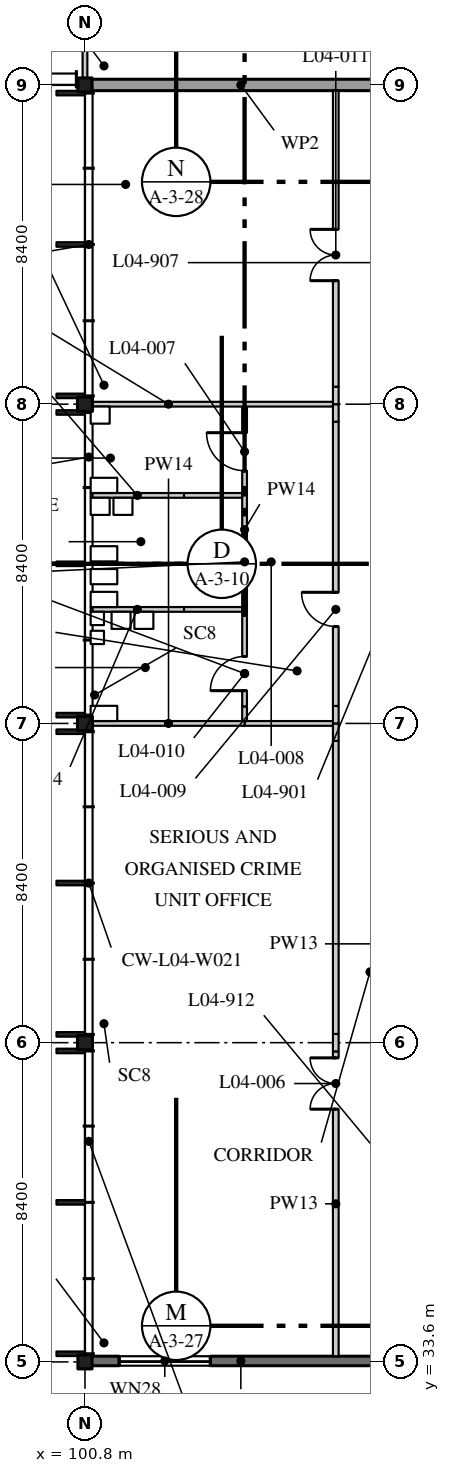
"""IFC4 building model, lengths in metres.
Left out: names, types, materials, properties, quantities, classifications, styles, units other than length and angle.
Written with IfcOpenShell. Run it as: python <this file> out.ifc"""

import sys

from ifc_helpers import new_model, si_unit, direction, frame, frame_2d, origin, origin_2d, place, context, subcontext, project, spatial, rectangle, i_section, extrude, element, fill, save


model = new_model("IFC4")
c1 = context("Model", 3, precision=1e-05, world=origin(), true_north=direction((0.0, 1.0)))
c2 = subcontext(c1, "Body", "Model", "MODEL_VIEW")
j1 = project(units=[si_unit("LENGTHUNIT", "METRE"), si_unit("PLANEANGLEUNIT", "RADIAN")], contexts=[c1])
p1 = place(None, origin())
s1 = spatial("IfcSite", under=j1, at=p1, CompositionType="ELEMENT")
p2 = place(p1, origin())
s2 = spatial("IfcBuilding", under=s1, at=p2, CompositionType="ELEMENT")
p3 = place(p2, frame((0.0, 0.0, 18.9)))
s3 = spatial("IfcBuildingStorey", under=s2, at=p3, CompositionType="ELEMENT", Elevation=18.9)
p4 = place(p3, frame((100.8, 33.6, 0.0), z_axis=(0.0, 0.0, 1.0), x_axis=(1.0, 0.0, 0.0)))
e1 = element("IfcColumn", 1, at=p4, inside=s3, PredefinedType="COLUMN", context=c2, shape_type="SweptSolid", body=[
    extrude(i_section(OverallWidth=0.373, OverallDepth=0.368, WebThickness=0.015, FlangeThickness=0.024, FilletRadius=0.015, at=origin_2d()), origin(), (0.0, 0.0, 1.0), 4.37),
])
for number, where, z_axis, x_axis in (
    (2, (100.8, 42.0, 0.0), (0.0, 0.0, 1.0), (1.0, 0.0, 0.0)),
    (3, (100.8, 50.4, 0.0), (0.0, 0.0, 1.0), (1.0, 0.0, 0.0)),
    (4, (100.8, 58.8, 0.0), (0.0, 0.0, 1.0), (1.0, 0.0, 0.0)),
):
    element("IfcColumn", number, at=place(p3, frame(where, z_axis=z_axis, x_axis=x_axis)), inside=s3, PredefinedType="COLUMN", context=c2, shape_type="SweptSolid", body=[
        extrude(i_section(OverallWidth=0.394, OverallDepth=0.376, WebThickness=0.017, FlangeThickness=0.028, FilletRadius=0.015, at=origin_2d()), origin(), (0.0, 0.0, 1.0), 4.37),
    ])
p5 = place(p3, frame((100.8, 67.2, 0.0), z_axis=(0.0, 0.0, 1.0), x_axis=(1.0, 0.0, 0.0)))
e5 = element("IfcColumn", 5, at=p5, inside=s3, PredefinedType="COLUMN", context=c2, shape_type="SweptSolid", body=[
    extrude(i_section(OverallWidth=0.373, OverallDepth=0.368, WebThickness=0.015, FlangeThickness=0.024, FilletRadius=0.015, at=origin_2d()), origin(), (0.0, 0.0, 1.0), 4.37),
])
p6 = place(p3, frame((107.4, 33.75, 0.0), z_axis=(0.0, 0.0, 1.0), x_axis=(0.0, 1.0, 0.0)))
e6 = element("IfcWall", 6, at=p6, inside=s3, PredefinedType="PARTITIONING", context=c2, shape_type="SweptSolid", body=[
    extrude(rectangle(XDim=8.02, YDim=0.15, at=frame_2d((4.01, 0.0))), origin(), (0.0, 0.0, 1.0), 4.37),
])
p7 = place(p6, frame((6.5, 0.0, 0.0)))
e7 = element("IfcOpeningElement", 7, at=p7, cuts=e6, PredefinedType="OPENING", context=c2, shape_type="SweptSolid", body=[
    extrude(rectangle(XDim=1.35, YDim=2.1, at=frame_2d((0.675, 1.05))), frame((0.0, 0.085, 0.0), z_axis=(0.0, -1.0, 0.0), x_axis=(1.0, 0.0, 0.0)), (0.0, 0.0, 1.0), 0.17),
])
p8 = place(p3, frame((107.4, 41.77, 0.0), z_axis=(0.0, 0.0, 1.0), x_axis=(0.0, 1.0, 0.0)))
e8 = element("IfcWall", 8, at=p8, inside=s3, PredefinedType="PARTITIONING", context=c2, shape_type="SweptSolid", body=[
    extrude(rectangle(XDim=0.46, YDim=0.15, at=frame_2d((0.23, 0.0))), origin(), (0.0, 0.0, 1.0), 3.746),
])
p9 = place(p3, frame((107.4, 42.23, 0.0), z_axis=(0.0, 0.0, 1.0), x_axis=(0.0, 1.0, 0.0)))
e9 = element("IfcWall", 9, at=p9, inside=s3, PredefinedType="PARTITIONING", context=c2, shape_type="SweptSolid", body=[
    extrude(rectangle(XDim=7.71, YDim=0.15, at=frame_2d((3.855, 0.0))), origin(), (0.0, 0.0, 1.0), 4.37),
])
p10 = place(p3, frame((107.4, 49.94, 0.0), z_axis=(0.0, 0.0, 1.0), x_axis=(0.0, 1.0, 0.0)))
e10 = element("IfcWall", 10, at=p10, inside=s3, PredefinedType="PARTITIONING", context=c2, shape_type="SweptSolid", body=[
    extrude(rectangle(XDim=0.46, YDim=0.15, at=frame_2d((0.23, 0.0))), origin(), (0.0, 0.0, 1.0), 3.746),
])
p11 = place(p3, frame((107.4, 50.4, 0.0), z_axis=(0.0, 0.0, 1.0), x_axis=(0.0, 1.0, 0.0)))
e11 = element("IfcWall", 11, at=p11, inside=s3, PredefinedType="PARTITIONING", context=c2, shape_type="SweptSolid", body=[
    extrude(rectangle(XDim=0.46, YDim=0.15, at=frame_2d((0.23, 0.0))), origin(), (0.0, 0.0, 1.0), 3.746),
])
p12 = place(p3, frame((107.4, 50.86, 0.0), z_axis=(0.0, 0.0, 1.0), x_axis=(0.0, 1.0, 0.0)))
e12 = element("IfcWall", 12, at=p12, inside=s3, PredefinedType="PARTITIONING", context=c2, shape_type="SweptSolid", body=[
    extrude(rectangle(XDim=7.48, YDim=0.15, at=frame_2d((3.74, 0.0))), origin(), (0.0, 0.0, 1.0), 4.37),
])
p13 = place(p12, frame((2.09, 0.0, 0.0)))
e13 = element("IfcOpeningElement", 13, at=p13, cuts=e12, PredefinedType="OPENING", context=c2, shape_type="SweptSolid", body=[
    extrude(rectangle(XDim=0.9, YDim=2.1, at=frame_2d((0.45, 1.05))), frame((0.0, 0.085, 0.0), z_axis=(0.0, -1.0, 0.0), x_axis=(1.0, 0.0, 0.0)), (0.0, 0.0, 1.0), 0.17),
])
for number, where, z_axis, x_axis in (
    (14, (107.4, 58.34, 0.0), (0.0, 0.0, 1.0), (0.0, 1.0, 0.0)),
    (15, (107.4, 58.8, 0.0), (0.0, 0.0, 1.0), (0.0, 1.0, 0.0)),
):
    element("IfcWall", number, at=place(p3, frame(where, z_axis=z_axis, x_axis=x_axis)), inside=s3, PredefinedType="PARTITIONING", context=c2, shape_type="SweptSolid", body=[
        extrude(rectangle(XDim=0.46, YDim=0.15, at=frame_2d((0.23, 0.0))), origin(), (0.0, 0.0, 1.0), 3.746),
    ])
p14 = place(p3, frame((107.4, 59.26, 0.0), z_axis=(0.0, 0.0, 1.0), x_axis=(0.0, 1.0, 0.0)))
e16 = element("IfcWall", 16, at=p14, inside=s3, PredefinedType="PARTITIONING", context=c2, shape_type="SweptSolid", body=[
    extrude(rectangle(XDim=7.79, YDim=0.15, at=frame_2d((3.895, 0.0))), origin(), (0.0, 0.0, 1.0), 4.37),
])
p15 = place(p14, frame((2.79, 0.0, 0.0)))
e17 = element("IfcOpeningElement", 17, at=p15, cuts=e16, PredefinedType="OPENING", context=c2, shape_type="SweptSolid", body=[
    extrude(rectangle(XDim=1.35, YDim=2.1, at=frame_2d((0.675, 1.05))), frame((0.0, 0.085, 0.0), z_axis=(0.0, -1.0, 0.0), x_axis=(1.0, 0.0, 0.0)), (0.0, 0.0, 1.0), 0.17),
])
p16 = place(p3, frame((105.0, 50.4, 0.0), z_axis=(0.0, 0.0, 1.0), x_axis=(1.0, 0.0, 0.0)))
e18 = element("IfcWall", 18, at=p16, inside=s3, PredefinedType="PARTITIONING", context=c2, shape_type="SweptSolid", body=[
    extrude(rectangle(XDim=2.325, YDim=0.125, at=frame_2d((1.163, 0.0))), origin(), (0.0, 0.0, 1.0), 3.746),
])
p17 = place(p3, frame((100.997, 50.4, 0.0), z_axis=(0.0, 0.0, 1.0), x_axis=(1.0, 0.0, 0.0)))
e19 = element("IfcWall", 19, at=p17, inside=s3, PredefinedType="PARTITIONING", context=c2, shape_type="SweptSolid", body=[
    extrude(rectangle(XDim=4.003, YDim=0.125, at=frame_2d((2.001, 0.0))), origin(), (0.0, 0.0, 1.0), 3.746),
])
p18 = place(p3, frame((100.95, 56.4, 0.0), z_axis=(0.0, 0.0, 1.0), x_axis=(1.0, 0.0, 0.0)))
e20 = element("IfcWall", 20, at=p18, inside=s3, PredefinedType="PARTITIONING", context=c2, shape_type="SweptSolid", body=[
    extrude(rectangle(XDim=2.457, YDim=0.125, at=frame_2d((1.229, 0.0))), origin(), (0.0, 0.0, 1.0), 4.37),
])
p19 = place(p3, frame((103.407, 56.4, 0.0), z_axis=(0.0, 0.0, 1.0), x_axis=(1.0, 0.0, 0.0)))
e21 = element("IfcWall", 21, at=p19, inside=s3, PredefinedType="PARTITIONING", context=c2, shape_type="SweptSolid", body=[
    extrude(rectangle(XDim=1.531, YDim=0.125, at=frame_2d((0.766, 0.0))), origin(), (0.0, 0.0, 1.0), 3.895),
])
p20 = place(p3, frame((105.0, 56.4, 0.0), z_axis=(0.0, 0.0, 1.0), x_axis=(0.0, 1.0, 0.0)))
e22 = element("IfcWall", 22, at=p20, inside=s3, PredefinedType="PARTITIONING", context=c2, shape_type="SweptSolid", body=[
    extrude(rectangle(XDim=1.952, YDim=0.125, at=frame_2d((0.976, 0.0))), origin(), (0.0, 0.0, 1.0), 4.37),
])
p21 = place(p20, frame((0.65, 0.0, 0.0)))
e23 = element("IfcOpeningElement", 23, at=p21, cuts=e22, PredefinedType="OPENING", context=c2, shape_type="SweptSolid", body=[
    extrude(rectangle(XDim=1.0, YDim=2.1, at=frame_2d((0.5, 1.05))), frame((0.0, 0.073, 0.0), z_axis=(0.0, -1.0, 0.0), x_axis=(1.0, 0.0, 0.0)), (0.0, 0.0, 1.0), 0.145),
])
p22 = place(p3, frame((105.0, 58.352, 0.0), z_axis=(0.0, 0.0, 1.0), x_axis=(0.0, 1.0, 0.0)))
e24 = element("IfcWall", 24, at=p22, inside=s3, PredefinedType="PARTITIONING", context=c2, shape_type="SweptSolid", body=[
    extrude(rectangle(XDim=0.385, YDim=0.125, at=frame_2d((0.192, 0.0))), origin(), (0.0, 0.0, 1.0), 3.746),
])
p23 = place(p3, frame((100.997, 58.8, 0.0), z_axis=(0.0, 0.0, 1.0), x_axis=(1.0, 0.0, 0.0)))
e25 = element("IfcWall", 25, at=p23, inside=s3, PredefinedType="PARTITIONING", context=c2, shape_type="SweptSolid", body=[
    extrude(rectangle(XDim=4.003, YDim=0.125, at=frame_2d((2.001, 0.0))), origin(), (0.0, 0.0, 1.0), 3.746),
])
p24 = place(p3, frame((105.0, 53.4, 0.0), z_axis=(0.0, 0.0, 1.0), x_axis=(0.0, 1.0, 0.0)))
e26 = element("IfcWall", 26, at=p24, inside=s3, PredefinedType="PARTITIONING", context=c2, shape_type="SweptSolid", body=[
    extrude(rectangle(XDim=3.0, YDim=0.125, at=frame_2d((1.5, 0.0))), origin(), (0.0, 0.0, 1.0), 4.37),
])
p25 = place(p24, frame((0.8, 0.0, 0.0)))
e27 = element("IfcOpeningElement", 27, at=p25, cuts=e26, PredefinedType="OPENING", context=c2, shape_type="SweptSolid", body=[
    extrude(rectangle(XDim=0.9, YDim=2.1, at=frame_2d((0.45, 1.05))), frame((0.0, 0.073, 0.0), z_axis=(0.0, -1.0, 0.0), x_axis=(1.0, 0.0, 0.0)), (0.0, 0.0, 1.0), 0.145),
])
p26 = place(p3, frame((100.95, 53.4, 0.0), z_axis=(0.0, 0.0, 1.0), x_axis=(1.0, 0.0, 0.0)))
e28 = element("IfcWall", 28, at=p26, inside=s3, PredefinedType="PARTITIONING", context=c2, shape_type="SweptSolid", body=[
    extrude(rectangle(XDim=2.457, YDim=0.125, at=frame_2d((1.229, 0.0))), origin(), (0.0, 0.0, 1.0), 4.37),
])
p27 = place(p3, frame((103.407, 53.4, 0.0), z_axis=(0.0, 0.0, 1.0), x_axis=(1.0, 0.0, 0.0)))
e29 = element("IfcWall", 29, at=p27, inside=s3, PredefinedType="PARTITIONING", context=c2, shape_type="SweptSolid", body=[
    extrude(rectangle(XDim=1.531, YDim=0.125, at=frame_2d((0.766, 0.0))), origin(), (0.0, 0.0, 1.0), 3.895),
])
p28 = place(p3, frame((105.0, 50.462, 0.0), z_axis=(0.0, 0.0, 1.0), x_axis=(0.0, 1.0, 0.0)))
e30 = element("IfcWall", 30, at=p28, inside=s3, PredefinedType="PARTITIONING", context=c2, shape_type="SweptSolid", body=[
    extrude(rectangle(XDim=0.385, YDim=0.125, at=frame_2d((0.192, 0.0))), origin(), (0.0, 0.0, 1.0), 3.746),
])
p29 = place(p3, frame((105.0, 50.847, 0.0), z_axis=(0.0, 0.0, 1.0), x_axis=(0.0, 1.0, 0.0)))
e31 = element("IfcWall", 31, at=p29, inside=s3, PredefinedType="PARTITIONING", context=c2, shape_type="SweptSolid", body=[
    extrude(rectangle(XDim=2.553, YDim=0.125, at=frame_2d((1.276, 0.0))), origin(), (0.0, 0.0, 1.0), 4.37),
])
p30 = place(p29, frame((0.415, 0.0, 0.0)))
e32 = element("IfcOpeningElement", 32, at=p30, cuts=e31, PredefinedType="OPENING", context=c2, shape_type="SweptSolid", body=[
    extrude(rectangle(XDim=0.9, YDim=2.1, at=frame_2d((0.45, 1.05))), frame((0.0, 0.073, 0.0), z_axis=(0.0, -1.0, 0.0), x_axis=(1.0, 0.0, 0.0)), (0.0, 0.0, 1.0), 0.145),
])
p31 = place(p3, frame((105.0, 58.8, 0.0), z_axis=(0.0, 0.0, 1.0), x_axis=(1.0, 0.0, 0.0)))
e33 = element("IfcWall", 33, at=p31, inside=s3, PredefinedType="PARTITIONING", context=c2, shape_type="SweptSolid", body=[
    extrude(rectangle(XDim=2.325, YDim=0.125, at=frame_2d((1.163, 0.0))), origin(), (0.0, 0.0, 1.0), 3.746),
])
p32 = place(p3, frame((100.8, 67.384, 0.0), z_axis=(0.0, 0.0, 1.0), x_axis=(0.0, 1.0, 0.0)))
e34 = element("IfcWall", 34, at=p32, inside=s3, PredefinedType="PARTITIONING", context=c2, shape_type="SweptSolid", body=[
    extrude(rectangle(XDim=6.641, YDim=0.125, at=frame_2d((3.32, 0.0))), origin(), (0.0, 0.0, 1.0), 3.819),
])
p33 = place(p3, frame((100.803, 33.625, 0.0), z_axis=(0.0, 0.0, 1.0), x_axis=(1.0, 0.0, 0.0)))
e35 = element("IfcWall", 35, at=p33, inside=s3, PredefinedType="SOLIDWALL", context=c2, shape_type="SweptSolid", body=[
    extrude(rectangle(XDim=8.197, YDim=0.25, at=frame_2d((4.099, 0.0))), origin(), (0.0, 0.0, 1.0), 3.746),
])
p34 = place(p33, frame((0.897, 0.0, 0.9)))
e36 = element("IfcOpeningElement", 36, at=p34, cuts=e35, PredefinedType="OPENING", context=c2, shape_type="SweptSolid", body=[
    extrude(rectangle(XDim=2.4, YDim=2.1, at=frame_2d((1.2, 1.05))), frame((0.0, 0.135, 0.0), z_axis=(0.0, -1.0, 0.0), x_axis=(1.0, 0.0, 0.0)), (0.0, 0.0, 1.0), 0.27),
])
p35 = place(p3, frame((109.0, 67.2, 0.0), z_axis=(0.0, 0.0, 1.0), x_axis=(-1.0, 0.0, 0.0)))
e37 = element("IfcWall", 37, at=p35, inside=s3, PredefinedType="SOLIDWALL", context=c2, shape_type="SweptSolid", body=[
    extrude(rectangle(XDim=8.197, YDim=0.3, at=frame_2d((4.099, 0.0))), origin(), (0.0, 0.0, 1.0), 3.746),
])
p36 = place(p7, origin())
e38 = element("IfcDoor", 38, at=p36, inside=s3, OperationType="DOUBLE_DOOR_SINGLE_SWING", PredefinedType="DOOR", context=c2, shape_type="SweptSolid", body=[
    extrude(rectangle(XDim=1.35, YDim=2.1, at=frame_2d((0.675, 1.05))), frame((0.0, 0.025, 0.0), z_axis=(0.0, -1.0, 0.0), x_axis=(1.0, 0.0, 0.0)), (0.0, 0.0, 1.0), 0.05),
])
fill(e7, e38)
p37 = place(p21, origin())
e39 = element("IfcDoor", 39, at=p37, inside=s3, OperationType="SINGLE_SWING_LEFT", PredefinedType="DOOR", context=c2, shape_type="SweptSolid", body=[
    extrude(rectangle(XDim=1.0, YDim=2.1, at=frame_2d((0.5, 1.05))), frame((0.0, 0.02, 0.0), z_axis=(0.0, -1.0, 0.0), x_axis=(1.0, 0.0, 0.0)), (0.0, 0.0, 1.0), 0.04),
])
fill(e23, e39)
p38 = place(p25, origin())
e40 = element("IfcDoor", 40, at=p38, inside=s3, OperationType="SINGLE_SWING_RIGHT", PredefinedType="DOOR", context=c2, shape_type="SweptSolid", body=[
    extrude(rectangle(XDim=0.9, YDim=2.1, at=frame_2d((0.45, 1.05))), frame((0.0, 0.02, 0.0), z_axis=(0.0, -1.0, 0.0), x_axis=(1.0, 0.0, 0.0)), (0.0, 0.0, 1.0), 0.04),
])
fill(e27, e40)
p39 = place(p13, origin())
e41 = element("IfcDoor", 41, at=p39, inside=s3, OperationType="SINGLE_SWING_LEFT", PredefinedType="DOOR", context=c2, shape_type="SweptSolid", body=[
    extrude(rectangle(XDim=0.9, YDim=2.1, at=frame_2d((0.45, 1.05))), frame((0.0, 0.025, 0.0), z_axis=(0.0, -1.0, 0.0), x_axis=(1.0, 0.0, 0.0)), (0.0, 0.0, 1.0), 0.05),
])
fill(e13, e41)
p40 = place(p30, origin())
e42 = element("IfcDoor", 42, at=p40, inside=s3, OperationType="SINGLE_SWING_RIGHT", PredefinedType="DOOR", context=c2, shape_type="SweptSolid", body=[
    extrude(rectangle(XDim=0.9, YDim=2.1, at=frame_2d((0.45, 1.05))), frame((0.0, 0.02, 0.0), z_axis=(0.0, -1.0, 0.0), x_axis=(1.0, 0.0, 0.0)), (0.0, 0.0, 1.0), 0.04),
])
fill(e32, e42)
p41 = place(p15, origin())
e43 = element("IfcDoor", 43, at=p41, inside=s3, OperationType="DOUBLE_DOOR_SINGLE_SWING", PredefinedType="DOOR", context=c2, shape_type="SweptSolid", body=[
    extrude(rectangle(XDim=1.35, YDim=2.1, at=frame_2d((0.675, 1.05))), frame((0.0, 0.025, 0.0), z_axis=(0.0, -1.0, 0.0), x_axis=(1.0, 0.0, 0.0)), (0.0, 0.0, 1.0), 0.05),
])
fill(e17, e43)
p42 = place(p34, origin())
e44 = element("IfcWindow", 44, at=p42, inside=s3, PartitioningType="SINGLE_PANEL", PredefinedType="WINDOW", context=c2, shape_type="SweptSolid", body=[
    extrude(rectangle(XDim=2.4, YDim=2.1, at=frame_2d((1.2, 1.05))), frame((0.0, 0.04, 0.0), z_axis=(0.0, -1.0, 0.0), x_axis=(1.0, 0.0, 0.0)), (0.0, 0.0, 1.0), 0.08),
])
fill(e36, e44)
save(model, sys.argv[1])
